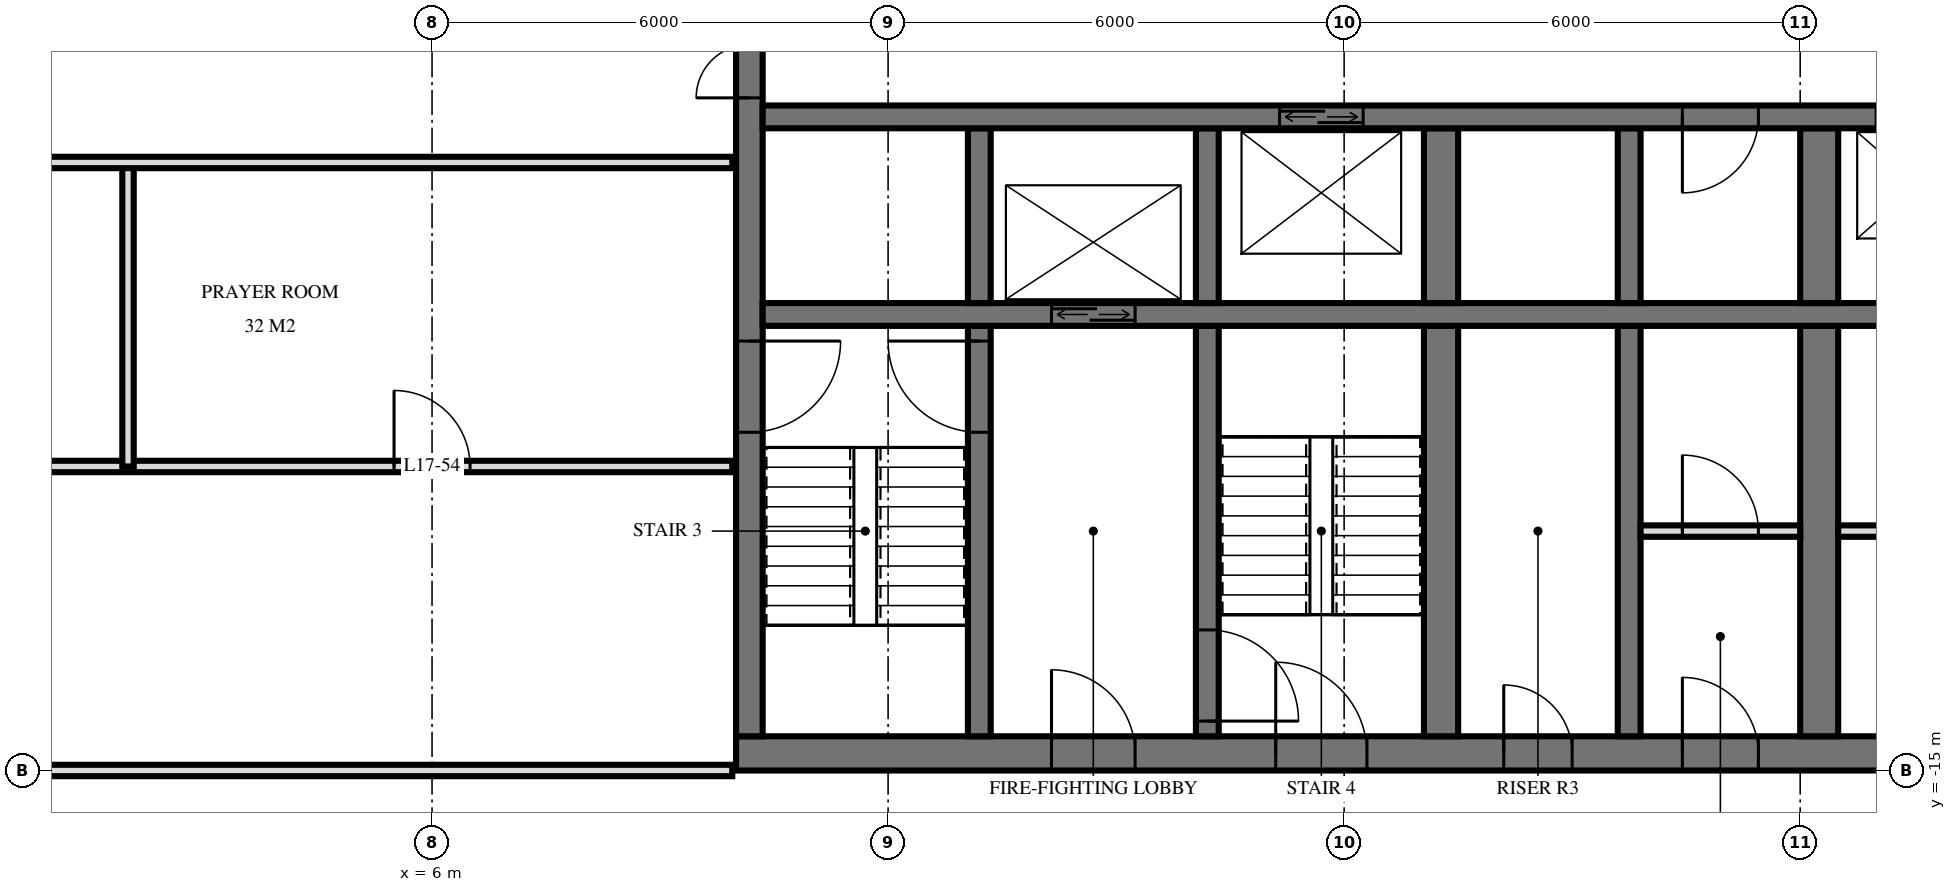
"""IFC4 building model, lengths in metres.
Left out: names, types, materials, properties, quantities, classifications, styles, units other than length and angle.
Written with IfcOpenShell. Run it as: python <this file> out.ifc"""

import sys

from ifc_helpers import new_model, si_unit, direction, frame, frame_2d, origin, place, context, subcontext, project, spatial, rectangle, extrude, element, fill, save


model = new_model("IFC4")
c1 = context("Model", 3, precision=1e-05, world=origin(), true_north=direction((0.0, 1.0)))
c2 = subcontext(c1, "Body", "Model", "MODEL_VIEW")
j1 = project(units=[si_unit("LENGTHUNIT", "METRE"), si_unit("PLANEANGLEUNIT", "RADIAN")], contexts=[c1])
p1 = place(None, origin())
s1 = spatial("IfcSite", under=j1, at=p1, CompositionType="ELEMENT")
p2 = place(p1, origin())
s2 = spatial("IfcBuilding", under=s1, at=p2, CompositionType="ELEMENT")
p3 = place(p2, frame((0.0, 0.0, 70.8)))
s3 = spatial("IfcBuildingStorey", under=s2, at=p3, CompositionType="ELEMENT", Elevation=70.8)
p4 = place(p3, frame((10.0, -14.775, 0.0), z_axis=(0.0, 0.0, 1.0), x_axis=(1.0, 0.0, 0.0)))
e1 = element("IfcWall", 1, at=p4, inside=s3, PredefinedType="SHEAR", context=c2, shape_type="SweptSolid", body=[
    extrude(rectangle(XDim=19.5, YDim=0.45, at=frame_2d((9.75, 0.0))), origin(), (0.0, 0.0, 1.0), 3.6),
])
p5 = place(p4, frame((7.1, 0.0, 0.0)))
e2 = element("IfcOpeningElement", 2, at=p5, cuts=e1, PredefinedType="OPENING", context=c2, shape_type="SweptSolid", body=[
    extrude(rectangle(XDim=1.2, YDim=2.1, at=frame_2d((0.6, 1.05))), frame((0.0, 0.235, 0.0), z_axis=(0.0, -1.0, 0.0), x_axis=(1.0, 0.0, 0.0)), (0.0, 0.0, 1.0), 0.47),
])
p6 = place(p4, frame((4.15, 0.0, 0.0)))
e3 = element("IfcOpeningElement", 3, at=p6, cuts=e1, PredefinedType="OPENING", context=c2, shape_type="SweptSolid", body=[
    extrude(rectangle(XDim=1.1, YDim=2.1, at=frame_2d((0.55, 1.05))), frame((0.0, 0.235, 0.0), z_axis=(0.0, -1.0, 0.0), x_axis=(1.0, 0.0, 0.0)), (0.0, 0.0, 1.0), 0.47),
])
p7 = place(p4, frame((10.1, 0.0, 0.0)))
e4 = element("IfcOpeningElement", 4, at=p7, cuts=e1, PredefinedType="OPENING", context=c2, shape_type="SweptSolid", body=[
    extrude(rectangle(XDim=0.9, YDim=2.1, at=frame_2d((0.45, 1.05))), frame((0.0, 0.235, 0.0), z_axis=(0.0, -1.0, 0.0), x_axis=(1.0, 0.0, 0.0)), (0.0, 0.0, 1.0), 0.47),
])
p8 = place(p4, frame((12.45, 0.0, 0.0)))
e5 = element("IfcOpeningElement", 5, at=p8, cuts=e1, PredefinedType="OPENING", context=c2, shape_type="SweptSolid", body=[
    extrude(rectangle(XDim=1.0, YDim=2.1, at=frame_2d((0.5, 1.05))), frame((0.0, 0.235, 0.0), z_axis=(0.0, -1.0, 0.0), x_axis=(1.0, 0.0, 0.0)), (0.0, 0.0, 1.0), 0.47),
])
p9 = place(p4, frame((16.25, 0.0, 0.0)))
e6 = element("IfcOpeningElement", 6, at=p9, cuts=e1, PredefinedType="OPENING", context=c2, shape_type="SweptSolid", body=[
    extrude(rectangle(XDim=1.0, YDim=2.1, at=frame_2d((0.5, 1.05))), frame((0.0, 0.235, 0.0), z_axis=(0.0, -1.0, 0.0), x_axis=(1.0, 0.0, 0.0)), (0.0, 0.0, 1.0), 0.47),
])
p10 = place(p3, frame((10.175, -14.55, 0.0), z_axis=(0.0, 0.0, 1.0), x_axis=(0.0, 1.0, 0.0)))
e7 = element("IfcWall", 7, at=p10, inside=s3, PredefinedType="SHEAR", context=c2, shape_type="SweptSolid", body=[
    extrude(rectangle(XDim=14.1, YDim=0.35, at=frame_2d((7.05, 0.0))), origin(), (0.0, 0.0, 1.0), 3.6),
])
p11 = place(p10, frame((8.4, 0.0, 0.0)))
e8 = element("IfcOpeningElement", 8, at=p11, cuts=e7, PredefinedType="OPENING", context=c2, shape_type="SweptSolid", body=[
    extrude(rectangle(XDim=1.4, YDim=2.4, at=frame_2d((0.7, 1.2))), frame((0.0, 0.185, 0.0), z_axis=(0.0, -1.0, 0.0), x_axis=(1.0, 0.0, 0.0)), (0.0, 0.0, 1.0), 0.37),
])
p12 = place(p10, frame((10.0, 0.0, 0.0)))
e9 = element("IfcOpeningElement", 9, at=p12, cuts=e7, PredefinedType="OPENING", context=c2, shape_type="SweptSolid", body=[
    extrude(rectangle(XDim=1.4, YDim=2.4, at=frame_2d((0.7, 1.2))), frame((0.0, 0.185, 0.0), z_axis=(0.0, -1.0, 0.0), x_axis=(1.0, 0.0, 0.0)), (0.0, 0.0, 1.0), 0.37),
])
p13 = place(p10, frame((4.0, 0.0, 0.0)))
e10 = element("IfcOpeningElement", 10, at=p13, cuts=e7, PredefinedType="OPENING", context=c2, shape_type="SweptSolid", body=[
    extrude(rectangle(XDim=1.2, YDim=2.1, at=frame_2d((0.6, 1.05))), frame((0.0, 0.185, 0.0), z_axis=(0.0, -1.0, 0.0), x_axis=(1.0, 0.0, 0.0)), (0.0, 0.0, 1.0), 0.37),
])
p14 = place(p3, frame((10.35, -6.4, 0.0), z_axis=(0.0, 0.0, 1.0), x_axis=(1.0, 0.0, 0.0)))
e11 = element("IfcWall", 11, at=p14, inside=s3, PredefinedType="SHEAR", context=c2, shape_type="SweptSolid", body=[
    extrude(rectangle(XDim=18.7, YDim=0.3, at=frame_2d((9.35, 0.0))), origin(), (0.0, 0.0, 1.0), 3.6),
])
p15 = place(p14, frame((14.65, 0.0, 0.0)))
e12 = element("IfcOpeningElement", 12, at=p15, cuts=e11, PredefinedType="OPENING", context=c2, shape_type="SweptSolid", body=[
    extrude(rectangle(XDim=1.1, YDim=2.1, at=frame_2d((0.55, 1.05))), frame((0.0, 0.16, 0.0), z_axis=(0.0, -1.0, 0.0), x_axis=(1.0, 0.0, 0.0)), (0.0, 0.0, 1.0), 0.32),
])
p16 = place(p14, frame((17.05, 0.0, 0.0)))
e13 = element("IfcOpeningElement", 13, at=p16, cuts=e11, PredefinedType="OPENING", context=c2, shape_type="SweptSolid", body=[
    extrude(rectangle(XDim=1.1, YDim=2.1, at=frame_2d((0.55, 1.05))), frame((0.0, 0.16, 0.0), z_axis=(0.0, -1.0, 0.0), x_axis=(1.0, 0.0, 0.0)), (0.0, 0.0, 1.0), 0.32),
])
p17 = place(p14, frame((6.8, 0.0, 0.0)))
e14 = element("IfcOpeningElement", 14, at=p17, cuts=e11, PredefinedType="OPENING", context=c2, shape_type="SweptSolid", body=[
    extrude(rectangle(XDim=1.1, YDim=2.1, at=frame_2d((0.55, 1.05))), frame((0.0, 0.16, 0.0), z_axis=(0.0, -1.0, 0.0), x_axis=(1.0, 0.0, 0.0)), (0.0, 0.0, 1.0), 0.32),
])
p18 = place(p14, frame((12.1, 0.0, 0.0)))
e15 = element("IfcOpeningElement", 15, at=p18, cuts=e11, PredefinedType="OPENING", context=c2, shape_type="SweptSolid", body=[
    extrude(rectangle(XDim=1.0, YDim=2.1, at=frame_2d((0.5, 1.05))), frame((0.0, 0.16, 0.0), z_axis=(0.0, -1.0, 0.0), x_axis=(1.0, 0.0, 0.0)), (0.0, 0.0, 1.0), 0.32),
])
p19 = place(p3, frame((10.35, -9.0, 0.0), z_axis=(0.0, 0.0, 1.0), x_axis=(1.0, 0.0, 0.0)))
e16 = element("IfcWall", 16, at=p19, inside=s3, PredefinedType="SHEAR", context=c2, shape_type="SweptSolid", body=[
    extrude(rectangle(XDim=18.7, YDim=0.3, at=frame_2d((9.35, 0.0))), origin(), (0.0, 0.0, 1.0), 3.6),
])
p20 = place(p19, frame((3.8, 0.0, 0.0)))
e17 = element("IfcOpeningElement", 17, at=p20, cuts=e16, PredefinedType="OPENING", context=c2, shape_type="SweptSolid", body=[
    extrude(rectangle(XDim=1.1, YDim=2.1, at=frame_2d((0.55, 1.05))), frame((0.0, 0.16, 0.0), z_axis=(0.0, -1.0, 0.0), x_axis=(1.0, 0.0, 0.0)), (0.0, 0.0, 1.0), 0.32),
])
p21 = place(p3, frame((13.2, -8.85, 0.0), z_axis=(0.0, 0.0, 1.0), x_axis=(0.0, 1.0, 0.0)))
e18 = element("IfcWall", 18, at=p21, inside=s3, PredefinedType="SHEAR", context=c2, shape_type="SweptSolid", body=[
    extrude(rectangle(XDim=2.3, YDim=0.3, at=frame_2d((1.15, 0.0))), origin(), (0.0, 0.0, 1.0), 3.6),
])
p22 = place(p3, frame((13.2, -14.55, 0.0), z_axis=(0.0, 0.0, 1.0), x_axis=(0.0, 1.0, 0.0)))
e19 = element("IfcWall", 19, at=p22, inside=s3, PredefinedType="SHEAR", context=c2, shape_type="SweptSolid", body=[
    extrude(rectangle(XDim=5.4, YDim=0.3, at=frame_2d((2.7, 0.0))), origin(), (0.0, 0.0, 1.0), 3.6),
])
p23 = place(p22, frame((4.0, 0.0, 0.0)))
e20 = element("IfcOpeningElement", 20, at=p23, cuts=e19, PredefinedType="OPENING", context=c2, shape_type="SweptSolid", body=[
    extrude(rectangle(XDim=1.2, YDim=2.1, at=frame_2d((0.6, 1.05))), frame((0.0, 0.16, 0.0), z_axis=(0.0, -1.0, 0.0), x_axis=(1.0, 0.0, 0.0)), (0.0, 0.0, 1.0), 0.32),
])
p24 = place(p3, frame((16.2, -8.85, 0.0), z_axis=(0.0, 0.0, 1.0), x_axis=(0.0, 1.0, 0.0)))
e21 = element("IfcWall", 21, at=p24, inside=s3, PredefinedType="SHEAR", context=c2, shape_type="SweptSolid", body=[
    extrude(rectangle(XDim=2.3, YDim=0.3, at=frame_2d((1.15, 0.0))), origin(), (0.0, 0.0, 1.0), 3.6),
])
p25 = place(p3, frame((16.2, -14.55, 0.0), z_axis=(0.0, 0.0, 1.0), x_axis=(0.0, 1.0, 0.0)))
e22 = element("IfcWall", 22, at=p25, inside=s3, PredefinedType="SHEAR", context=c2, shape_type="SweptSolid", body=[
    extrude(rectangle(XDim=5.4, YDim=0.3, at=frame_2d((2.7, 0.0))), origin(), (0.0, 0.0, 1.0), 3.6),
])
p26 = place(p25, frame((0.2, 0.0, 0.0)))
e23 = element("IfcOpeningElement", 23, at=p26, cuts=e22, PredefinedType="OPENING", context=c2, shape_type="SweptSolid", body=[
    extrude(rectangle(XDim=1.2, YDim=2.1, at=frame_2d((0.6, 1.05))), frame((0.0, 0.16, 0.0), z_axis=(0.0, -1.0, 0.0), x_axis=(1.0, 0.0, 0.0)), (0.0, 0.0, 1.0), 0.32),
])
p27 = place(p3, frame((19.275, -8.85, 0.0), z_axis=(0.0, 0.0, 1.0), x_axis=(0.0, 1.0, 0.0)))
e24 = element("IfcWall", 24, at=p27, inside=s3, PredefinedType="SHEAR", context=c2, shape_type="SweptSolid", body=[
    extrude(rectangle(XDim=2.3, YDim=0.45, at=frame_2d((1.15, 0.0))), origin(), (0.0, 0.0, 1.0), 3.6),
])
p28 = place(p3, frame((19.275, -14.55, 0.0), z_axis=(0.0, 0.0, 1.0), x_axis=(0.0, 1.0, 0.0)))
e25 = element("IfcWall", 25, at=p28, inside=s3, PredefinedType="SHEAR", context=c2, shape_type="SweptSolid", body=[
    extrude(rectangle(XDim=5.4, YDim=0.45, at=frame_2d((2.7, 0.0))), origin(), (0.0, 0.0, 1.0), 3.6),
])
p29 = place(p3, frame((21.75, -8.85, 0.0), z_axis=(0.0, 0.0, 1.0), x_axis=(0.0, 1.0, 0.0)))
e26 = element("IfcWall", 26, at=p29, inside=s3, PredefinedType="SHEAR", context=c2, shape_type="SweptSolid", body=[
    extrude(rectangle(XDim=2.3, YDim=0.3, at=frame_2d((1.15, 0.0))), origin(), (0.0, 0.0, 1.0), 3.6),
])
p30 = place(p3, frame((21.75, -14.55, 0.0), z_axis=(0.0, 0.0, 1.0), x_axis=(0.0, 1.0, 0.0)))
e27 = element("IfcWall", 27, at=p30, inside=s3, PredefinedType="SHEAR", context=c2, shape_type="SweptSolid", body=[
    extrude(rectangle(XDim=5.4, YDim=0.3, at=frame_2d((2.7, 0.0))), origin(), (0.0, 0.0, 1.0), 3.6),
])
p31 = place(p3, frame((24.25, -8.85, 0.0), z_axis=(0.0, 0.0, 1.0), x_axis=(0.0, 1.0, 0.0)))
e28 = element("IfcWall", 28, at=p31, inside=s3, PredefinedType="SHEAR", context=c2, shape_type="SweptSolid", body=[
    extrude(rectangle(XDim=2.3, YDim=0.5, at=frame_2d((1.15, 0.0))), origin(), (0.0, 0.0, 1.0), 3.6),
])
p32 = place(p3, frame((24.25, -14.55, 0.0), z_axis=(0.0, 0.0, 1.0), x_axis=(0.0, 1.0, 0.0)))
e29 = element("IfcWall", 29, at=p32, inside=s3, PredefinedType="SHEAR", context=c2, shape_type="SweptSolid", body=[
    extrude(rectangle(XDim=5.4, YDim=0.5, at=frame_2d((2.7, 0.0))), origin(), (0.0, 0.0, 1.0), 3.6),
])
p33 = place(p3, frame((21.9, -11.85, 0.0), z_axis=(0.0, 0.0, 1.0), x_axis=(1.0, 0.0, 0.0)))
e30 = element("IfcWall", 30, at=p33, inside=s3, PredefinedType="PARTITIONING", context=c2, shape_type="SweptSolid", body=[
    extrude(rectangle(XDim=2.1, YDim=0.15, at=frame_2d((1.05, 0.0))), origin(), (0.0, 0.0, 1.0), 3.3),
])
p34 = place(p33, frame((0.55, 0.0, 0.0)))
e31 = element("IfcOpeningElement", 31, at=p34, cuts=e30, PredefinedType="OPENING", context=c2, shape_type="SweptSolid", body=[
    extrude(rectangle(XDim=1.0, YDim=2.1, at=frame_2d((0.5, 1.05))), frame((0.0, 0.085, 0.0), z_axis=(0.0, -1.0, 0.0), x_axis=(1.0, 0.0, 0.0)), (0.0, 0.0, 1.0), 0.17),
])
p35 = place(p3, frame((24.5, -11.85, 0.0), z_axis=(0.0, 0.0, 1.0), x_axis=(1.0, 0.0, 0.0)))
e32 = element("IfcWall", 32, at=p35, inside=s3, PredefinedType="PARTITIONING", context=c2, shape_type="SweptSolid", body=[
    extrude(rectangle(XDim=4.5, YDim=0.15, at=frame_2d((2.25, 0.0))), origin(), (0.0, 0.0, 1.0), 3.3),
])
p36 = place(p35, frame((1.75, 0.0, 0.0)))
e33 = element("IfcOpeningElement", 33, at=p36, cuts=e32, PredefinedType="OPENING", context=c2, shape_type="SweptSolid", body=[
    extrude(rectangle(XDim=1.0, YDim=2.1, at=frame_2d((0.5, 1.05))), frame((0.0, 0.085, 0.0), z_axis=(0.0, -1.0, 0.0), x_axis=(1.0, 0.0, 0.0)), (0.0, 0.0, 1.0), 0.17),
])
p37 = place(p3, frame((2.0, -11.0, 0.0), z_axis=(0.0, 0.0, 1.0), x_axis=(0.0, 1.0, 0.0)))
e34 = element("IfcWall", 34, at=p37, inside=s3, PredefinedType="PARTITIONING", context=c2, shape_type="SweptSolid", body=[
    extrude(rectangle(XDim=4.0, YDim=0.15, at=frame_2d((2.0, 0.0))), origin(), (0.0, 0.0, 1.0), 3.32),
])
p38 = place(p3, frame((-9.95, -15.0, 0.0), z_axis=(0.0, 0.0, 1.0), x_axis=(1.0, 0.0, 0.0)))
e35 = element("IfcWall", 35, at=p38, inside=s3, PredefinedType="PARTITIONING", context=c2, shape_type="SweptSolid", body=[
    extrude(rectangle(XDim=19.9, YDim=0.15, at=frame_2d((9.95, 0.0))), origin(), (0.0, 0.0, 1.0), 2.684),
])
p39 = place(p38, frame((9.45, 0.0, 0.0)))
e36 = element("IfcOpeningElement", 36, at=p39, cuts=e35, PredefinedType="OPENING", context=c2, shape_type="SweptSolid", body=[
    extrude(rectangle(XDim=1.0, YDim=2.1, at=frame_2d((0.5, 1.05))), frame((0.0, 0.085, 0.0), z_axis=(0.0, -1.0, 0.0), x_axis=(1.0, 0.0, 0.0)), (0.0, 0.0, 1.0), 0.17),
])
p40 = place(p3, frame((-9.95, -11.0, 0.0), z_axis=(0.0, 0.0, 1.0), x_axis=(1.0, 0.0, 0.0)))
e37 = element("IfcWall", 37, at=p40, inside=s3, PredefinedType="PARTITIONING", context=c2, shape_type="SweptSolid", body=[
    extrude(rectangle(XDim=19.9, YDim=0.15, at=frame_2d((9.95, 0.0))), origin(), (0.0, 0.0, 1.0), 3.32),
])
p41 = place(p40, frame((9.45, 0.0, 0.0)))
e38 = element("IfcOpeningElement", 38, at=p41, cuts=e37, PredefinedType="OPENING", context=c2, shape_type="SweptSolid", body=[
    extrude(rectangle(XDim=1.0, YDim=2.1, at=frame_2d((0.5, 1.05))), frame((0.0, 0.085, 0.0), z_axis=(0.0, -1.0, 0.0), x_axis=(1.0, 0.0, 0.0)), (0.0, 0.0, 1.0), 0.17),
])
p42 = place(p40, frame((15.45, 0.0, 0.0)))
e39 = element("IfcOpeningElement", 39, at=p42, cuts=e37, PredefinedType="OPENING", context=c2, shape_type="SweptSolid", body=[
    extrude(rectangle(XDim=1.0, YDim=2.1, at=frame_2d((0.5, 1.05))), frame((0.0, 0.085, 0.0), z_axis=(0.0, -1.0, 0.0), x_axis=(1.0, 0.0, 0.0)), (0.0, 0.0, 1.0), 0.17),
])
p43 = place(p3, frame((-9.95, -7.0, 0.0), z_axis=(0.0, 0.0, 1.0), x_axis=(1.0, 0.0, 0.0)))
e40 = element("IfcWall", 40, at=p43, inside=s3, PredefinedType="PARTITIONING", context=c2, shape_type="SweptSolid", body=[
    extrude(rectangle(XDim=19.9, YDim=0.15, at=frame_2d((9.95, 0.0))), origin(), (0.0, 0.0, 1.0), 3.32),
])
p44 = place(p43, frame((9.45, 0.0, 0.0)))
e41 = element("IfcOpeningElement", 41, at=p44, cuts=e40, PredefinedType="OPENING", context=c2, shape_type="SweptSolid", body=[
    extrude(rectangle(XDim=1.0, YDim=2.1, at=frame_2d((0.5, 1.05))), frame((0.0, 0.085, 0.0), z_axis=(0.0, -1.0, 0.0), x_axis=(1.0, 0.0, 0.0)), (0.0, 0.0, 1.0), 0.17),
])
p45 = place(p43, frame((3.45, 0.0, 0.0)))
e42 = element("IfcOpeningElement", 42, at=p45, cuts=e40, PredefinedType="OPENING", context=c2, shape_type="SweptSolid", body=[
    extrude(rectangle(XDim=1.0, YDim=2.1, at=frame_2d((0.5, 1.05))), frame((0.0, 0.085, 0.0), z_axis=(0.0, -1.0, 0.0), x_axis=(1.0, 0.0, 0.0)), (0.0, 0.0, 1.0), 0.17),
])
p46 = place(p20, origin())
e43 = element("IfcDoor", 43, at=p46, inside=s3, OperationType="DOUBLE_DOOR_SLIDING", PredefinedType="USERDEFINED", context=c2, shape_type="SweptSolid", body=[
    extrude(rectangle(XDim=1.1, YDim=2.1, at=frame_2d((0.55, 1.05))), frame((0.0, 0.025, 0.0), z_axis=(0.0, -1.0, 0.0), x_axis=(1.0, 0.0, 0.0)), (0.0, 0.0, 1.0), 0.05),
])
fill(e17, e43)
p47 = place(p17, origin())
e44 = element("IfcDoor", 44, at=p47, inside=s3, OperationType="DOUBLE_DOOR_SLIDING", PredefinedType="USERDEFINED", context=c2, shape_type="SweptSolid", body=[
    extrude(rectangle(XDim=1.1, YDim=2.1, at=frame_2d((0.55, 1.05))), frame((0.0, 0.025, 0.0), z_axis=(0.0, -1.0, 0.0), x_axis=(1.0, 0.0, 0.0)), (0.0, 0.0, 1.0), 0.05),
])
fill(e14, e44)
p48 = place(p11, origin())
e45 = element("IfcDoor", 45, at=p48, inside=s3, OperationType="DOUBLE_DOOR_SINGLE_SWING", PredefinedType="DOOR", context=c2, shape_type="SweptSolid", body=[
    extrude(rectangle(XDim=1.4, YDim=2.4, at=frame_2d((0.7, 1.2))), frame((0.0, 0.025, 0.0), z_axis=(0.0, -1.0, 0.0), x_axis=(1.0, 0.0, 0.0)), (0.0, 0.0, 1.0), 0.05),
])
fill(e8, e45)
p49 = place(p13, frame((0.6, 0.0, 0.0), z_axis=(0.0, 0.0, 1.0), x_axis=(-1.0, 0.0, 0.0)))
e46 = element("IfcDoor", 46, at=p49, inside=s3, OperationType="SINGLE_SWING_RIGHT", PredefinedType="DOOR", context=c2, shape_type="SweptSolid", body=[
    extrude(rectangle(XDim=1.2, YDim=2.1, at=frame_2d((0.0, 1.05))), frame((0.0, -0.025, 0.0), z_axis=(0.0, 1.0, 0.0), x_axis=(-1.0, 0.0, 0.0)), (0.0, 0.0, 1.0), 0.05),
])
fill(e10, e46)
p50 = place(p5, origin())
e47 = element("IfcDoor", 47, at=p50, inside=s3, OperationType="SINGLE_SWING_RIGHT", PredefinedType="DOOR", context=c2, shape_type="SweptSolid", body=[
    extrude(rectangle(XDim=1.2, YDim=2.1, at=frame_2d((0.6, 1.05))), frame((0.0, 0.025, 0.0), z_axis=(0.0, -1.0, 0.0), x_axis=(1.0, 0.0, 0.0)), (0.0, 0.0, 1.0), 0.05),
])
fill(e2, e47)
p51 = place(p6, origin())
e48 = element("IfcDoor", 48, at=p51, inside=s3, OperationType="SINGLE_SWING_RIGHT", PredefinedType="DOOR", context=c2, shape_type="SweptSolid", body=[
    extrude(rectangle(XDim=1.1, YDim=2.1, at=frame_2d((0.55, 1.05))), frame((0.0, 0.025, 0.0), z_axis=(0.0, -1.0, 0.0), x_axis=(1.0, 0.0, 0.0)), (0.0, 0.0, 1.0), 0.05),
])
fill(e3, e48)
p52 = place(p7, origin())
e49 = element("IfcDoor", 49, at=p52, inside=s3, OperationType="SINGLE_SWING_RIGHT", PredefinedType="DOOR", context=c2, shape_type="SweptSolid", body=[
    extrude(rectangle(XDim=0.9, YDim=2.1, at=frame_2d((0.45, 1.05))), frame((0.0, 0.025, 0.0), z_axis=(0.0, -1.0, 0.0), x_axis=(1.0, 0.0, 0.0)), (0.0, 0.0, 1.0), 0.05),
])
fill(e4, e49)
p53 = place(p8, origin())
e50 = element("IfcDoor", 50, at=p53, inside=s3, OperationType="SINGLE_SWING_RIGHT", PredefinedType="DOOR", context=c2, shape_type="SweptSolid", body=[
    extrude(rectangle(XDim=1.0, YDim=2.1, at=frame_2d((0.5, 1.05))), frame((0.0, 0.025, 0.0), z_axis=(0.0, -1.0, 0.0), x_axis=(1.0, 0.0, 0.0)), (0.0, 0.0, 1.0), 0.05),
])
fill(e5, e50)
p54 = place(p18, frame((0.5, 0.0, 0.0), z_axis=(0.0, 0.0, 1.0), x_axis=(-1.0, 0.0, 0.0)))
e51 = element("IfcDoor", 51, at=p54, inside=s3, OperationType="SINGLE_SWING_LEFT", PredefinedType="DOOR", context=c2, shape_type="SweptSolid", body=[
    extrude(rectangle(XDim=1.0, YDim=2.1, at=frame_2d((0.0, 1.05))), frame((0.0, -0.025, 0.0), z_axis=(0.0, 1.0, 0.0), x_axis=(-1.0, 0.0, 0.0)), (0.0, 0.0, 1.0), 0.05),
])
fill(e15, e51)
p55 = place(p23, origin())
e52 = element("IfcDoor", 52, at=p55, inside=s3, OperationType="SINGLE_SWING_LEFT", PredefinedType="DOOR", context=c2, shape_type="SweptSolid", body=[
    extrude(rectangle(XDim=1.2, YDim=2.1, at=frame_2d((0.6, 1.05))), frame((0.0, 0.025, 0.0), z_axis=(0.0, -1.0, 0.0), x_axis=(1.0, 0.0, 0.0)), (0.0, 0.0, 1.0), 0.05),
])
fill(e20, e52)
p56 = place(p26, frame((0.6, 0.0, 0.0), z_axis=(0.0, 0.0, 1.0), x_axis=(-1.0, 0.0, 0.0)))
e53 = element("IfcDoor", 53, at=p56, inside=s3, OperationType="SINGLE_SWING_LEFT", PredefinedType="DOOR", context=c2, shape_type="SweptSolid", body=[
    extrude(rectangle(XDim=1.2, YDim=2.1, at=frame_2d((0.0, 1.05))), frame((0.0, -0.025, 0.0), z_axis=(0.0, 1.0, 0.0), x_axis=(-1.0, 0.0, 0.0)), (0.0, 0.0, 1.0), 0.05),
])
fill(e23, e53)
p57 = place(p34, origin())
e54 = element("IfcDoor", 54, at=p57, inside=s3, OperationType="SINGLE_SWING_RIGHT", PredefinedType="DOOR", context=c2, shape_type="SweptSolid", body=[
    extrude(rectangle(XDim=1.0, YDim=2.1, at=frame_2d((0.5, 1.05))), frame((0.0, 0.025, 0.0), z_axis=(0.0, -1.0, 0.0), x_axis=(1.0, 0.0, 0.0)), (0.0, 0.0, 1.0), 0.05),
])
fill(e31, e54)
p58 = place(p42, origin())
e55 = element("IfcDoor", 55, at=p58, inside=s3, OperationType="SINGLE_SWING_RIGHT", PredefinedType="DOOR", context=c2, shape_type="SweptSolid", body=[
    extrude(rectangle(XDim=1.0, YDim=2.1, at=frame_2d((0.5, 1.05))), frame((0.0, 0.025, 0.0), z_axis=(0.0, -1.0, 0.0), x_axis=(1.0, 0.0, 0.0)), (0.0, 0.0, 1.0), 0.05),
])
fill(e39, e55)
save(model, sys.argv[1])
